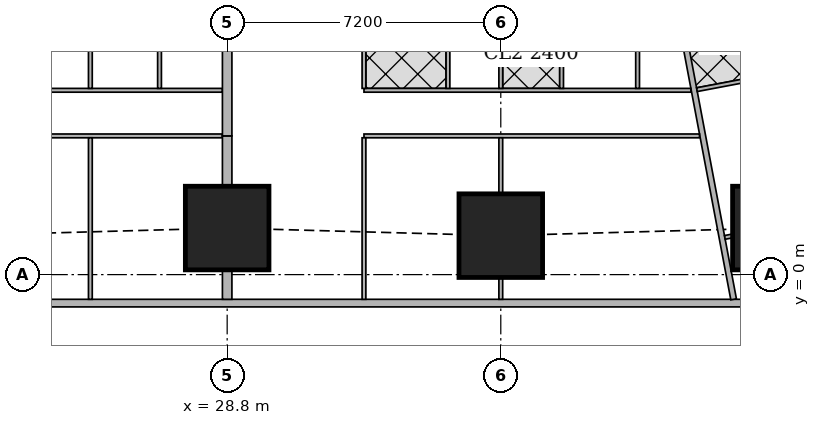
"""IFC4 building model, lengths in metres.
Left out: names, types, materials, properties, quantities, classifications, styles, units other than length and angle.
Written with IfcOpenShell. Run it as: python <this file> out.ifc"""

import sys

from ifc_helpers import new_model, si_unit, direction, frame, frame_2d, origin, origin_2d, place, context, subcontext, project, spatial, rectangle, extrude, element, fill, save


model = new_model("IFC4")
c1 = context("Model", 3, precision=1e-05, world=origin(), true_north=direction((0.0, 1.0)))
c2 = subcontext(c1, "Body", "Model", "MODEL_VIEW")
j1 = project(units=[si_unit("LENGTHUNIT", "METRE"), si_unit("PLANEANGLEUNIT", "RADIAN")], contexts=[c1])
p1 = place(None, origin())
s1 = spatial("IfcSite", under=j1, at=p1, CompositionType="ELEMENT")
p2 = place(p1, origin())
s2 = spatial("IfcBuilding", under=s1, at=p2, CompositionType="ELEMENT")
p3 = place(p2, frame((0.0, 0.0, 81.65)))
s3 = spatial("IfcBuildingStorey", under=s2, at=p3, CompositionType="ELEMENT", Elevation=81.65)
for number, where, z_axis, x_axis in (
    (1, (28.8, 1.225, 0.0), (0.0, 0.0, 1.0), (1.0, 0.0, 0.0)),
    (2, (36.0, 1.025, 0.0), (0.0, 0.0, 1.0), (1.0, 0.0, 0.0)),
    (3, (43.2, 1.225, 0.0), (0.0, 0.0, 1.0), (1.0, 0.0, 0.0)),
):
    element("IfcColumn", number, at=place(p3, frame(where, z_axis=z_axis, x_axis=x_axis)), inside=s3, PredefinedType="COLUMN", context=c2, shape_type="SweptSolid", body=[
        extrude(rectangle(XDim=2.2, YDim=2.2, at=origin_2d()), origin(), (0.0, 0.0, 1.0), 3.75),
    ])
p4 = place(p3, frame((2.163, -0.75, 0.0), z_axis=(0.0, 0.0, 1.0), x_axis=(1.0, 0.0, 0.0)))
e4 = element("IfcWall", 4, at=p4, inside=s3, PredefinedType="SOLIDWALL", context=c2, shape_type="SweptSolid", body=[
    extrude(rectangle(XDim=45.628, YDim=0.2, at=frame_2d((22.814, 0.0))), origin(), (0.0, 0.0, 1.0), 3.5),
])
p5 = place(p4, frame((9.537, 0.0, 0.9)))
e5 = element("IfcOpeningElement", 5, at=p5, cuts=e4, PredefinedType="OPENING", context=c2, shape_type="SweptSolid", body=[
    extrude(rectangle(XDim=1.8, YDim=1.5, at=frame_2d((0.9, 0.75))), frame((0.0, 0.11, 0.0), z_axis=(0.0, -1.0, 0.0), x_axis=(1.0, 0.0, 0.0)), (0.0, 0.0, 1.0), 0.22),
])
p6 = place(p4, frame((13.137, 0.0, 0.9)))
e6 = element("IfcOpeningElement", 6, at=p6, cuts=e4, PredefinedType="OPENING", context=c2, shape_type="SweptSolid", body=[
    extrude(rectangle(XDim=1.8, YDim=1.5, at=frame_2d((0.9, 0.75))), frame((0.0, 0.11, 0.0), z_axis=(0.0, -1.0, 0.0), x_axis=(1.0, 0.0, 0.0)), (0.0, 0.0, 1.0), 0.22),
])
p7 = place(p4, frame((16.737, 0.0, 0.9)))
e7 = element("IfcOpeningElement", 7, at=p7, cuts=e4, PredefinedType="OPENING", context=c2, shape_type="SweptSolid", body=[
    extrude(rectangle(XDim=1.8, YDim=1.5, at=frame_2d((0.9, 0.75))), frame((0.0, 0.11, 0.0), z_axis=(0.0, -1.0, 0.0), x_axis=(1.0, 0.0, 0.0)), (0.0, 0.0, 1.0), 0.22),
])
p8 = place(p4, frame((20.337, 0.0, 0.9)))
e8 = element("IfcOpeningElement", 8, at=p8, cuts=e4, PredefinedType="OPENING", context=c2, shape_type="SweptSolid", body=[
    extrude(rectangle(XDim=1.8, YDim=1.5, at=frame_2d((0.9, 0.75))), frame((0.0, 0.11, 0.0), z_axis=(0.0, -1.0, 0.0), x_axis=(1.0, 0.0, 0.0)), (0.0, 0.0, 1.0), 0.22),
])
p9 = place(p4, frame((23.937, 0.0, 0.9)))
e9 = element("IfcOpeningElement", 9, at=p9, cuts=e4, PredefinedType="OPENING", context=c2, shape_type="SweptSolid", body=[
    extrude(rectangle(XDim=1.8, YDim=1.5, at=frame_2d((0.9, 0.75))), frame((0.0, 0.11, 0.0), z_axis=(0.0, -1.0, 0.0), x_axis=(1.0, 0.0, 0.0)), (0.0, 0.0, 1.0), 0.22),
])
p10 = place(p4, frame((27.537, 0.0, 0.9)))
e10 = element("IfcOpeningElement", 10, at=p10, cuts=e4, PredefinedType="OPENING", context=c2, shape_type="SweptSolid", body=[
    extrude(rectangle(XDim=1.8, YDim=1.5, at=frame_2d((0.9, 0.75))), frame((0.0, 0.11, 0.0), z_axis=(0.0, -1.0, 0.0), x_axis=(1.0, 0.0, 0.0)), (0.0, 0.0, 1.0), 0.22),
])
p11 = place(p4, frame((31.137, 0.0, 0.9)))
e11 = element("IfcOpeningElement", 11, at=p11, cuts=e4, PredefinedType="OPENING", context=c2, shape_type="SweptSolid", body=[
    extrude(rectangle(XDim=1.8, YDim=1.5, at=frame_2d((0.9, 0.75))), frame((0.0, 0.11, 0.0), z_axis=(0.0, -1.0, 0.0), x_axis=(1.0, 0.0, 0.0)), (0.0, 0.0, 1.0), 0.22),
])
p12 = place(p4, frame((34.737, 0.0, 0.9)))
e12 = element("IfcOpeningElement", 12, at=p12, cuts=e4, PredefinedType="OPENING", context=c2, shape_type="SweptSolid", body=[
    extrude(rectangle(XDim=1.8, YDim=1.5, at=frame_2d((0.9, 0.75))), frame((0.0, 0.11, 0.0), z_axis=(0.0, -1.0, 0.0), x_axis=(1.0, 0.0, 0.0)), (0.0, 0.0, 1.0), 0.22),
])
p13 = place(p3, frame((33.382, 45.65, 0.0), z_axis=(0.0, 0.0, 1.0), x_axis=(0.185593544777, -0.982626600565, 0.0)))
e13 = element("IfcWall", 13, at=p13, inside=s3, PredefinedType="SOLIDWALL", context=c2, shape_type="SweptSolid", body=[
    extrude(rectangle(XDim=47.118, YDim=0.15, at=frame_2d((23.559, 0.0))), origin(), (0.0, 0.0, 1.0), 2.2),
])
p14 = place(p13, frame((19.054, 0.0, 0.0)))
e14 = element("IfcOpeningElement", 14, at=p14, cuts=e13, PredefinedType="OPENING", context=c2, shape_type="SweptSolid", body=[
    extrude(rectangle(XDim=1.0, YDim=2.1, at=frame_2d((0.5, 1.05))), frame((0.0, 0.085, 0.0), z_axis=(0.0, -1.0, 0.0), x_axis=(1.0, 0.0, 0.0)), (0.0, 0.0, 1.0), 0.17),
])
p15 = place(p13, frame((22.87, 0.0, 0.0)))
e15 = element("IfcOpeningElement", 15, at=p15, cuts=e13, PredefinedType="OPENING", context=c2, shape_type="SweptSolid", body=[
    extrude(rectangle(XDim=1.0, YDim=2.1, at=frame_2d((0.5, 1.05))), frame((0.0, 0.085, 0.0), z_axis=(0.0, -1.0, 0.0), x_axis=(1.0, 0.0, 0.0)), (0.0, 0.0, 1.0), 0.17),
])
p16 = place(p13, frame((33.833, 0.0, 0.0)))
e16 = element("IfcOpeningElement", 16, at=p16, cuts=e13, PredefinedType="OPENING", context=c2, shape_type="SweptSolid", body=[
    extrude(rectangle(XDim=1.0, YDim=2.1, at=frame_2d((0.5, 1.05))), frame((0.0, 0.085, 0.0), z_axis=(0.0, -1.0, 0.0), x_axis=(1.0, 0.0, 0.0)), (0.0, 0.0, 1.0), 0.17),
])
p17 = place(p3, frame((28.675, 3.65, 0.0), z_axis=(0.0, 0.0, 1.0), x_axis=(-1.0, 0.0, 0.0)))
e17 = element("IfcWall", 17, at=p17, inside=s3, PredefinedType="PARTITIONING", context=c2, shape_type="SweptSolid", body=[
    extrude(rectangle(XDim=10.675, YDim=0.1, at=frame_2d((5.337, 0.0))), origin(), (0.0, 0.0, 1.0), 3.5),
])
p18 = place(p17, frame((9.575, 0.0, 0.0)))
e18 = element("IfcOpeningElement", 18, at=p18, cuts=e17, PredefinedType="OPENING", context=c2, shape_type="SweptSolid", body=[
    extrude(rectangle(XDim=0.9, YDim=2.1, at=frame_2d((0.45, 1.05))), frame((0.0, 0.06, 0.0), z_axis=(0.0, -1.0, 0.0), x_axis=(1.0, 0.0, 0.0)), (0.0, 0.0, 1.0), 0.12),
])
p19 = place(p17, frame((5.975, 0.0, 0.0)))
e19 = element("IfcOpeningElement", 19, at=p19, cuts=e17, PredefinedType="OPENING", context=c2, shape_type="SweptSolid", body=[
    extrude(rectangle(XDim=0.9, YDim=2.1, at=frame_2d((0.45, 1.05))), frame((0.0, 0.06, 0.0), z_axis=(0.0, -1.0, 0.0), x_axis=(1.0, 0.0, 0.0)), (0.0, 0.0, 1.0), 0.12),
])
p20 = place(p17, frame((2.375, 0.0, 0.0)))
e20 = element("IfcOpeningElement", 20, at=p20, cuts=e17, PredefinedType="OPENING", context=c2, shape_type="SweptSolid", body=[
    extrude(rectangle(XDim=0.9, YDim=2.1, at=frame_2d((0.45, 1.05))), frame((0.0, 0.06, 0.0), z_axis=(0.0, -1.0, 0.0), x_axis=(1.0, 0.0, 0.0)), (0.0, 0.0, 1.0), 0.12),
])
p21 = place(p3, frame((28.675, 4.85, 0.0), z_axis=(0.0, 0.0, 1.0), x_axis=(-1.0, 0.0, 0.0)))
e21 = element("IfcWall", 21, at=p21, inside=s3, PredefinedType="PARTITIONING", context=c2, shape_type="SweptSolid", body=[
    extrude(rectangle(XDim=10.675, YDim=0.1, at=frame_2d((5.337, 0.0))), origin(), (0.0, 0.0, 1.0), 3.5),
])
p22 = place(p21, frame((9.12, 0.0, 0.0)))
e22 = element("IfcOpeningElement", 22, at=p22, cuts=e21, PredefinedType="OPENING", context=c2, shape_type="SweptSolid", body=[
    extrude(rectangle(XDim=0.9, YDim=2.1, at=frame_2d((0.45, 1.05))), frame((0.0, 0.06, 0.0), z_axis=(0.0, -1.0, 0.0), x_axis=(1.0, 0.0, 0.0)), (0.0, 0.0, 1.0), 0.12),
])
p23 = place(p21, frame((5.825, 0.0, 0.0)))
e23 = element("IfcOpeningElement", 23, at=p23, cuts=e21, PredefinedType="OPENING", context=c2, shape_type="SweptSolid", body=[
    extrude(rectangle(XDim=0.9, YDim=2.1, at=frame_2d((0.45, 1.05))), frame((0.0, 0.06, 0.0), z_axis=(0.0, -1.0, 0.0), x_axis=(1.0, 0.0, 0.0)), (0.0, 0.0, 1.0), 0.12),
])
p24 = place(p21, frame((2.115, 0.0, 0.0)))
e24 = element("IfcOpeningElement", 24, at=p24, cuts=e21, PredefinedType="OPENING", context=c2, shape_type="SweptSolid", body=[
    extrude(rectangle(XDim=0.9, YDim=2.1, at=frame_2d((0.45, 1.05))), frame((0.0, 0.06, 0.0), z_axis=(0.0, -1.0, 0.0), x_axis=(1.0, 0.0, 0.0)), (0.0, 0.0, 1.0), 0.12),
])
p25 = place(p21, frame((7.32, 0.0, 0.0)))
e25 = element("IfcOpeningElement", 25, at=p25, cuts=e21, PredefinedType="OPENING", context=c2, shape_type="SweptSolid", body=[
    extrude(rectangle(XDim=0.9, YDim=2.1, at=frame_2d((0.45, 1.05))), frame((0.0, 0.06, 0.0), z_axis=(0.0, -1.0, 0.0), x_axis=(1.0, 0.0, 0.0)), (0.0, 0.0, 1.0), 0.12),
])
p26 = place(p21, frame((4.025, 0.0, 0.0)))
e26 = element("IfcOpeningElement", 26, at=p26, cuts=e21, PredefinedType="OPENING", context=c2, shape_type="SweptSolid", body=[
    extrude(rectangle(XDim=0.9, YDim=2.1, at=frame_2d((0.45, 1.05))), frame((0.0, 0.06, 0.0), z_axis=(0.0, -1.0, 0.0), x_axis=(1.0, 0.0, 0.0)), (0.0, 0.0, 1.0), 0.12),
])
p27 = place(p21, frame((0.315, 0.0, 0.0)))
e27 = element("IfcOpeningElement", 27, at=p27, cuts=e21, PredefinedType="OPENING", context=c2, shape_type="SweptSolid", body=[
    extrude(rectangle(XDim=0.9, YDim=2.1, at=frame_2d((0.45, 1.05))), frame((0.0, 0.06, 0.0), z_axis=(0.0, -1.0, 0.0), x_axis=(1.0, 0.0, 0.0)), (0.0, 0.0, 1.0), 0.12),
])
p28 = place(p3, frame((25.2, -0.65, 0.0), z_axis=(0.0, 0.0, 1.0), x_axis=(0.0, 1.0, 0.0)))
e28 = element("IfcWall", 28, at=p28, inside=s3, PredefinedType="PARTITIONING", context=c2, shape_type="SweptSolid", body=[
    extrude(rectangle(XDim=4.25, YDim=0.1, at=frame_2d((2.125, 0.0))), origin(), (0.0, 0.0, 1.0), 2.2),
])
for number, where, z_axis, x_axis in (
    (29, (25.2, 4.9, 0.0), (0.0, 0.0, 1.0), (0.0, 1.0, 0.0)),
    (30, (27.02, 4.9, 0.0), (0.0, 0.0, 1.0), (0.0, 1.0, 0.0)),
):
    element("IfcWall", number, at=place(p3, frame(where, z_axis=z_axis, x_axis=x_axis)), inside=s3, PredefinedType="PARTITIONING", context=c2, shape_type="SweptSolid", body=[
        extrude(rectangle(XDim=3.275, YDim=0.1, at=frame_2d((1.638, 0.0))), origin(), (0.0, 0.0, 1.0), 3.5),
    ])
p29 = place(p3, frame((41.229, 3.65, 0.0), z_axis=(0.0, 0.0, 1.0), x_axis=(-1.0, 0.0, 0.0)))
e31 = element("IfcWall", 31, at=p29, inside=s3, PredefinedType="PARTITIONING", context=c2, shape_type="SweptSolid", body=[
    extrude(rectangle(XDim=8.829, YDim=0.1, at=frame_2d((4.415, 0.0))), origin(), (0.0, 0.0, 1.0), 3.5),
])
p30 = place(p29, frame((7.729, 0.0, 0.0)))
e32 = element("IfcOpeningElement", 32, at=p30, cuts=e31, PredefinedType="OPENING", context=c2, shape_type="SweptSolid", body=[
    extrude(rectangle(XDim=0.9, YDim=2.1, at=frame_2d((0.45, 1.05))), frame((0.0, 0.06, 0.0), z_axis=(0.0, -1.0, 0.0), x_axis=(1.0, 0.0, 0.0)), (0.0, 0.0, 1.0), 0.12),
])
p31 = place(p29, frame((4.129, 0.0, 0.0)))
e33 = element("IfcOpeningElement", 33, at=p31, cuts=e31, PredefinedType="OPENING", context=c2, shape_type="SweptSolid", body=[
    extrude(rectangle(XDim=0.9, YDim=2.1, at=frame_2d((0.45, 1.05))), frame((0.0, 0.06, 0.0), z_axis=(0.0, -1.0, 0.0), x_axis=(1.0, 0.0, 0.0)), (0.0, 0.0, 1.0), 0.12),
])
p32 = place(p3, frame((41.002, 4.85, 0.0), z_axis=(0.0, 0.0, 1.0), x_axis=(-1.0, 0.0, 0.0)))
e34 = element("IfcWall", 34, at=p32, inside=s3, PredefinedType="PARTITIONING", context=c2, shape_type="SweptSolid", body=[
    extrude(rectangle(XDim=8.602, YDim=0.1, at=frame_2d((4.301, 0.0))), origin(), (0.0, 0.0, 1.0), 3.5),
])
p33 = place(p32, frame((7.047, 0.0, 0.0)))
e35 = element("IfcOpeningElement", 35, at=p33, cuts=e34, PredefinedType="OPENING", context=c2, shape_type="SweptSolid", body=[
    extrude(rectangle(XDim=0.9, YDim=2.1, at=frame_2d((0.45, 1.05))), frame((0.0, 0.06, 0.0), z_axis=(0.0, -1.0, 0.0), x_axis=(1.0, 0.0, 0.0)), (0.0, 0.0, 1.0), 0.12),
])
p34 = place(p32, frame((3.752, 0.0, 0.0)))
e36 = element("IfcOpeningElement", 36, at=p34, cuts=e34, PredefinedType="OPENING", context=c2, shape_type="SweptSolid", body=[
    extrude(rectangle(XDim=0.9, YDim=2.1, at=frame_2d((0.45, 1.05))), frame((0.0, 0.06, 0.0), z_axis=(0.0, -1.0, 0.0), x_axis=(1.0, 0.0, 0.0)), (0.0, 0.0, 1.0), 0.12),
])
p35 = place(p32, frame((0.15, 0.0, 0.0)))
e37 = element("IfcOpeningElement", 37, at=p35, cuts=e34, PredefinedType="OPENING", context=c2, shape_type="SweptSolid", body=[
    extrude(rectangle(XDim=0.9, YDim=2.1, at=frame_2d((0.45, 1.05))), frame((0.0, 0.06, 0.0), z_axis=(0.0, -1.0, 0.0), x_axis=(1.0, 0.0, 0.0)), (0.0, 0.0, 1.0), 0.12),
])
p36 = place(p32, frame((5.247, 0.0, 0.0)))
e38 = element("IfcOpeningElement", 38, at=p36, cuts=e34, PredefinedType="OPENING", context=c2, shape_type="SweptSolid", body=[
    extrude(rectangle(XDim=0.9, YDim=2.1, at=frame_2d((0.45, 1.05))), frame((0.0, 0.06, 0.0), z_axis=(0.0, -1.0, 0.0), x_axis=(1.0, 0.0, 0.0)), (0.0, 0.0, 1.0), 0.12),
])
p37 = place(p32, frame((1.952, 0.0, 0.0)))
e39 = element("IfcOpeningElement", 39, at=p37, cuts=e34, PredefinedType="OPENING", context=c2, shape_type="SweptSolid", body=[
    extrude(rectangle(XDim=0.9, YDim=2.1, at=frame_2d((0.45, 1.05))), frame((0.0, 0.06, 0.0), z_axis=(0.0, -1.0, 0.0), x_axis=(1.0, 0.0, 0.0)), (0.0, 0.0, 1.0), 0.12),
])
p38 = place(p3, frame((32.4, -0.65, 0.0), z_axis=(0.0, 0.0, 1.0), x_axis=(0.0, 1.0, 0.0)))
e40 = element("IfcWall", 40, at=p38, inside=s3, PredefinedType="PARTITIONING", context=c2, shape_type="SweptSolid", body=[
    extrude(rectangle(XDim=4.25, YDim=0.1, at=frame_2d((2.125, 0.0))), origin(), (0.0, 0.0, 1.0), 2.2),
])
p39 = place(p3, frame((36.0, -0.65, 0.0), z_axis=(0.0, 0.0, 1.0), x_axis=(0.0, 1.0, 0.0)))
e41 = element("IfcWall", 41, at=p39, inside=s3, PredefinedType="PARTITIONING", context=c2, shape_type="SweptSolid", body=[
    extrude(rectangle(XDim=0.574, YDim=0.1, at=frame_2d((0.287, 0.0))), origin(), (0.0, 0.0, 1.0), 3.5),
])
p40 = place(p3, frame((36.0, 2.126, 0.0), z_axis=(0.0, 0.0, 1.0), x_axis=(0.0, 1.0, 0.0)))
e42 = element("IfcWall", 42, at=p40, inside=s3, PredefinedType="PARTITIONING", context=c2, shape_type="SweptSolid", body=[
    extrude(rectangle(XDim=1.474, YDim=0.1, at=frame_2d((0.737, 0.0))), origin(), (0.0, 0.0, 1.0), 3.5),
])
p41 = place(p3, frame((32.4, 4.9, 0.0), z_axis=(0.0, 0.0, 1.0), x_axis=(0.0, 1.0, 0.0)))
e43 = element("IfcWall", 43, at=p41, inside=s3, PredefinedType="PARTITIONING", context=c2, shape_type="SweptSolid", body=[
    extrude(rectangle(XDim=3.275, YDim=0.1, at=frame_2d((1.638, 0.0))), origin(), (0.0, 0.0, 1.0), 3.5),
])
p42 = place(p3, frame((36.0, 4.9, 0.0), z_axis=(0.0, 0.0, 1.0), x_axis=(0.0, 1.0, 0.0)))
e44 = element("IfcWall", 44, at=p42, inside=s3, PredefinedType="PARTITIONING", context=c2, shape_type="SweptSolid", body=[
    extrude(rectangle(XDim=1.799, YDim=0.1, at=frame_2d((0.899, 0.0))), origin(), (0.0, 0.0, 1.0), 3.5),
])
for number, where, z_axis, x_axis in (
    (45, (39.6, 4.9, 0.0), (0.0, 0.0, 1.0), (0.0, 1.0, 0.0)),
    (46, (34.61, 4.9, 0.0), (0.0, 0.0, 1.0), (0.0, 1.0, 0.0)),
    (47, (37.6, 4.9, 0.0), (0.0, 0.0, 1.0), (0.0, 1.0, 0.0)),
):
    element("IfcWall", number, at=place(p3, frame(where, z_axis=z_axis, x_axis=x_axis)), inside=s3, PredefinedType="PARTITIONING", context=c2, shape_type="SweptSolid", body=[
        extrude(rectangle(XDim=3.275, YDim=0.1, at=frame_2d((1.638, 0.0))), origin(), (0.0, 0.0, 1.0), 3.5),
    ])
p43 = place(p3, frame((28.8, -0.65, 0.0), z_axis=(0.0, 0.0, 1.0), x_axis=(0.0, 1.0, 0.0)))
e48 = element("IfcWall", 48, at=p43, inside=s3, PredefinedType="SOLIDWALL", context=c2, shape_type="SweptSolid", body=[
    extrude(rectangle(XDim=0.774, YDim=0.25, at=frame_2d((0.387, 0.0))), origin(), (0.0, 0.0, 1.0), 3.5),
])
p44 = place(p3, frame((28.8, 2.326, 0.0), z_axis=(0.0, 0.0, 1.0), x_axis=(0.0, 1.0, 0.0)))
e49 = element("IfcWall", 49, at=p44, inside=s3, PredefinedType="SOLIDWALL", context=c2, shape_type="SweptSolid", body=[
    extrude(rectangle(XDim=1.324, YDim=0.25, at=frame_2d((0.662, 0.0))), origin(), (0.0, 0.0, 1.0), 3.5),
])
p45 = place(p3, frame((28.8, 3.65, 0.0), z_axis=(0.0, 0.0, 1.0), x_axis=(0.0, 1.0, 0.0)))
e50 = element("IfcWall", 50, at=p45, inside=s3, PredefinedType="SOLIDWALL", context=c2, shape_type="SweptSolid", body=[
    extrude(rectangle(XDim=3.049, YDim=0.25, at=frame_2d((1.524, 0.0))), origin(), (0.0, 0.0, 1.0), 3.5),
])
p46 = place(p3, frame((42.09, 1.016, 0.0), z_axis=(0.0, 0.0, 1.0), x_axis=(-0.982208563973, -0.187793335502, 0.0)))
e51 = element("IfcWall", 51, at=p46, inside=s3, PredefinedType="PARTITIONING", context=c2, shape_type="SweptSolid", body=[
    extrude(rectangle(XDim=0.198, YDim=0.1, at=frame_2d((0.099, 0.0))), origin(), (0.0, 0.0, 1.0), 2.05),
])
p47 = place(p3, frame((44.379, 5.474, 0.0), z_axis=(0.0, 0.0, 1.0), x_axis=(-0.982607026909, -0.185697147715, 0.0)))
e52 = element("IfcWall", 52, at=p47, inside=s3, PredefinedType="PARTITIONING", context=c2, shape_type="SweptSolid", body=[
    extrude(rectangle(XDim=3.275, YDim=0.1, at=frame_2d((1.637, 0.0))), origin(), (0.0, 0.0, 1.0), 3.5),
])
p48 = place(p8, origin())
e53 = element("IfcWindow", 53, at=p48, inside=s3, PartitioningType="SINGLE_PANEL", PredefinedType="WINDOW", context=c2, shape_type="SweptSolid", body=[
    extrude(rectangle(XDim=1.8, YDim=1.5, at=frame_2d((0.9, 0.75))), frame((0.0, 0.03, 0.0), z_axis=(0.0, -1.0, 0.0), x_axis=(1.0, 0.0, 0.0)), (0.0, 0.0, 1.0), 0.06),
])
fill(e8, e53)
p49 = place(p9, origin())
e54 = element("IfcWindow", 54, at=p49, inside=s3, PartitioningType="SINGLE_PANEL", PredefinedType="WINDOW", context=c2, shape_type="SweptSolid", body=[
    extrude(rectangle(XDim=1.8, YDim=1.5, at=frame_2d((0.9, 0.75))), frame((0.0, 0.03, 0.0), z_axis=(0.0, -1.0, 0.0), x_axis=(1.0, 0.0, 0.0)), (0.0, 0.0, 1.0), 0.06),
])
fill(e9, e54)
p50 = place(p10, origin())
e55 = element("IfcWindow", 55, at=p50, inside=s3, PartitioningType="SINGLE_PANEL", PredefinedType="WINDOW", context=c2, shape_type="SweptSolid", body=[
    extrude(rectangle(XDim=1.8, YDim=1.5, at=frame_2d((0.9, 0.75))), frame((0.0, 0.03, 0.0), z_axis=(0.0, -1.0, 0.0), x_axis=(1.0, 0.0, 0.0)), (0.0, 0.0, 1.0), 0.06),
])
fill(e10, e55)
p51 = place(p11, origin())
e56 = element("IfcWindow", 56, at=p51, inside=s3, PartitioningType="SINGLE_PANEL", PredefinedType="WINDOW", context=c2, shape_type="SweptSolid", body=[
    extrude(rectangle(XDim=1.8, YDim=1.5, at=frame_2d((0.9, 0.75))), frame((0.0, 0.03, 0.0), z_axis=(0.0, -1.0, 0.0), x_axis=(1.0, 0.0, 0.0)), (0.0, 0.0, 1.0), 0.06),
])
fill(e11, e56)
p52 = place(p12, origin())
e57 = element("IfcWindow", 57, at=p52, inside=s3, PartitioningType="SINGLE_PANEL", PredefinedType="WINDOW", context=c2, shape_type="SweptSolid", body=[
    extrude(rectangle(XDim=1.8, YDim=1.5, at=frame_2d((0.9, 0.75))), frame((0.0, 0.03, 0.0), z_axis=(0.0, -1.0, 0.0), x_axis=(1.0, 0.0, 0.0)), (0.0, 0.0, 1.0), 0.06),
])
fill(e12, e57)
p53 = place(p20, origin())
e58 = element("IfcDoor", 58, at=p53, inside=s3, OperationType="SINGLE_SWING_RIGHT", PredefinedType="DOOR", context=c2, shape_type="SweptSolid", body=[
    extrude(rectangle(XDim=0.9, YDim=2.1, at=frame_2d((0.45, 1.05))), frame((0.0, 0.025, 0.0), z_axis=(0.0, -1.0, 0.0), x_axis=(1.0, 0.0, 0.0)), (0.0, 0.0, 1.0), 0.05),
])
fill(e20, e58)
p54 = place(p24, origin())
e59 = element("IfcDoor", 59, at=p54, inside=s3, OperationType="SINGLE_SWING_LEFT", PredefinedType="DOOR", context=c2, shape_type="SweptSolid", body=[
    extrude(rectangle(XDim=0.9, YDim=2.1, at=frame_2d((0.45, 1.05))), frame((0.0, 0.025, 0.0), z_axis=(0.0, -1.0, 0.0), x_axis=(1.0, 0.0, 0.0)), (0.0, 0.0, 1.0), 0.05),
])
fill(e24, e59)
p55 = place(p26, origin())
e60 = element("IfcDoor", 60, at=p55, inside=s3, OperationType="SINGLE_SWING_RIGHT", PredefinedType="DOOR", context=c2, shape_type="SweptSolid", body=[
    extrude(rectangle(XDim=0.9, YDim=2.1, at=frame_2d((0.45, 1.05))), frame((0.0, 0.025, 0.0), z_axis=(0.0, -1.0, 0.0), x_axis=(1.0, 0.0, 0.0)), (0.0, 0.0, 1.0), 0.05),
])
fill(e26, e60)
p56 = place(p27, origin())
e61 = element("IfcDoor", 61, at=p56, inside=s3, OperationType="SINGLE_SWING_RIGHT", PredefinedType="DOOR", context=c2, shape_type="SweptSolid", body=[
    extrude(rectangle(XDim=0.9, YDim=2.1, at=frame_2d((0.45, 1.05))), frame((0.0, 0.025, 0.0), z_axis=(0.0, -1.0, 0.0), x_axis=(1.0, 0.0, 0.0)), (0.0, 0.0, 1.0), 0.05),
])
fill(e27, e61)
p57 = place(p30, origin())
e62 = element("IfcDoor", 62, at=p57, inside=s3, OperationType="SINGLE_SWING_RIGHT", PredefinedType="DOOR", context=c2, shape_type="SweptSolid", body=[
    extrude(rectangle(XDim=0.9, YDim=2.1, at=frame_2d((0.45, 1.05))), frame((0.0, 0.025, 0.0), z_axis=(0.0, -1.0, 0.0), x_axis=(1.0, 0.0, 0.0)), (0.0, 0.0, 1.0), 0.05),
])
fill(e32, e62)
p58 = place(p31, origin())
e63 = element("IfcDoor", 63, at=p58, inside=s3, OperationType="SINGLE_SWING_RIGHT", PredefinedType="DOOR", context=c2, shape_type="SweptSolid", body=[
    extrude(rectangle(XDim=0.9, YDim=2.1, at=frame_2d((0.45, 1.05))), frame((0.0, 0.025, 0.0), z_axis=(0.0, -1.0, 0.0), x_axis=(1.0, 0.0, 0.0)), (0.0, 0.0, 1.0), 0.05),
])
fill(e33, e63)
p59 = place(p33, origin())
e64 = element("IfcDoor", 64, at=p59, inside=s3, OperationType="SINGLE_SWING_LEFT", PredefinedType="DOOR", context=c2, shape_type="SweptSolid", body=[
    extrude(rectangle(XDim=0.9, YDim=2.1, at=frame_2d((0.45, 1.05))), frame((0.0, 0.025, 0.0), z_axis=(0.0, -1.0, 0.0), x_axis=(1.0, 0.0, 0.0)), (0.0, 0.0, 1.0), 0.05),
])
fill(e35, e64)
p60 = place(p34, origin())
e65 = element("IfcDoor", 65, at=p60, inside=s3, OperationType="SINGLE_SWING_LEFT", PredefinedType="DOOR", context=c2, shape_type="SweptSolid", body=[
    extrude(rectangle(XDim=0.9, YDim=2.1, at=frame_2d((0.45, 1.05))), frame((0.0, 0.025, 0.0), z_axis=(0.0, -1.0, 0.0), x_axis=(1.0, 0.0, 0.0)), (0.0, 0.0, 1.0), 0.05),
])
fill(e36, e65)
p61 = place(p35, origin())
e66 = element("IfcDoor", 66, at=p61, inside=s3, OperationType="SINGLE_SWING_RIGHT", PredefinedType="DOOR", context=c2, shape_type="SweptSolid", body=[
    extrude(rectangle(XDim=0.9, YDim=2.1, at=frame_2d((0.45, 1.05))), frame((0.0, 0.025, 0.0), z_axis=(0.0, -1.0, 0.0), x_axis=(1.0, 0.0, 0.0)), (0.0, 0.0, 1.0), 0.05),
])
fill(e37, e66)
p62 = place(p36, origin())
e67 = element("IfcDoor", 67, at=p62, inside=s3, OperationType="SINGLE_SWING_RIGHT", PredefinedType="DOOR", context=c2, shape_type="SweptSolid", body=[
    extrude(rectangle(XDim=0.9, YDim=2.1, at=frame_2d((0.45, 1.05))), frame((0.0, 0.025, 0.0), z_axis=(0.0, -1.0, 0.0), x_axis=(1.0, 0.0, 0.0)), (0.0, 0.0, 1.0), 0.05),
])
fill(e38, e67)
p63 = place(p37, origin())
e68 = element("IfcDoor", 68, at=p63, inside=s3, OperationType="SINGLE_SWING_RIGHT", PredefinedType="DOOR", context=c2, shape_type="SweptSolid", body=[
    extrude(rectangle(XDim=0.9, YDim=2.1, at=frame_2d((0.45, 1.05))), frame((0.0, 0.025, 0.0), z_axis=(0.0, -1.0, 0.0), x_axis=(1.0, 0.0, 0.0)), (0.0, 0.0, 1.0), 0.05),
])
fill(e39, e68)
save(model, sys.argv[1])
